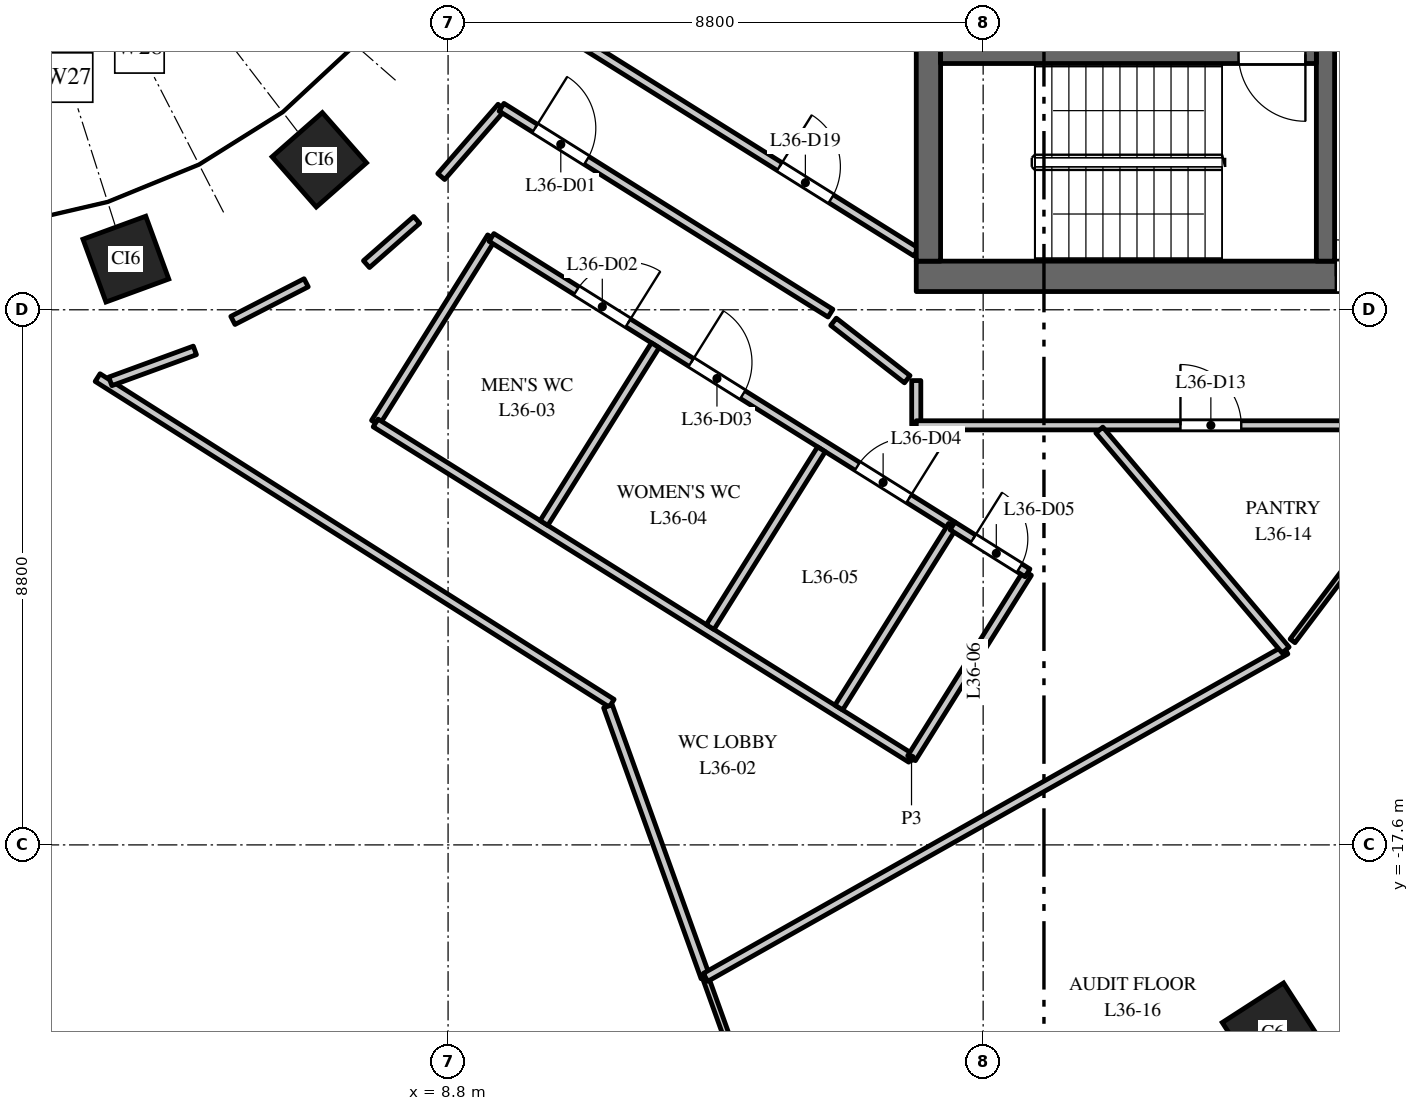
"""IFC4 building model, lengths in metres.
Left out: names, types, materials, properties, quantities, classifications, styles, units other than length and angle.
Written with IfcOpenShell. Run it as: python <this file> out.ifc"""

import sys

from ifc_helpers import new_model, si_unit, direction, frame, frame_2d, origin, origin_2d, place, context, subcontext, project, spatial, rectangle, extrude, element, fill, save


model = new_model("IFC4")
c1 = context("Model", 3, precision=1e-05, world=origin(), true_north=direction((0.0, 1.0)))
c2 = subcontext(c1, "Body", "Model", "MODEL_VIEW")
j1 = project(units=[si_unit("LENGTHUNIT", "METRE"), si_unit("PLANEANGLEUNIT", "RADIAN")], contexts=[c1])
p1 = place(None, origin())
s1 = spatial("IfcSite", under=j1, at=p1, CompositionType="ELEMENT")
p2 = place(p1, origin())
s2 = spatial("IfcBuilding", under=s1, at=p2, CompositionType="ELEMENT")
p3 = place(p2, frame((0.0, 0.0, 158.0)))
s3 = spatial("IfcBuildingStorey", under=s2, at=p3, CompositionType="ELEMENT", Elevation=158.0)
p4 = place(p3, frame((22.362, -20.7, 0.0), z_axis=(0.0, 0.0, 1.0), x_axis=(0.840247639643, 0.542202825586, 0.0)))
e1 = element("IfcColumn", 1, at=p4, inside=s3, PredefinedType="COLUMN", context=c2, shape_type="SweptSolid", body=[
    extrude(rectangle(XDim=1.2, YDim=1.2, at=origin_2d()), origin(), (0.0, 0.0, 1.0), 4.0),
])
for number, where, z_axis, x_axis in (
    (2, (3.501, -7.967, 0.0), (0.0, 0.0, 1.0), (0.939, 0.344, 0.0)),
    (3, (6.682, -6.334, 0.0), (0.0, 0.0, 1.0), (0.751, 0.66, 0.0)),
):
    element("IfcColumn", number, at=place(p3, frame(where, z_axis=z_axis, x_axis=x_axis)), inside=s3, PredefinedType="COLUMN", context=c2, shape_type="SweptSolid", body=[
        extrude(rectangle(XDim=1.1, YDim=1.1, at=origin_2d()), origin(), (0.0, 0.0, 1.0), 4.0),
    ])
p5 = place(p3, frame((16.5, -8.25, 0.0), z_axis=(0.0, 0.0, 1.0), x_axis=(1.0, 0.0, 0.0)))
e4 = element("IfcWall", 4, at=p5, inside=s3, PredefinedType="SHEAR", context=c2, shape_type="SweptSolid", body=[
    extrude(rectangle(XDim=15.0, YDim=0.5, at=frame_2d((7.5, 0.0))), origin(), (0.0, 0.0, 1.0), 3.7),
])
p6 = place(p5, frame((6.9, 0.0, 0.0)))
e5 = element("IfcOpeningElement", 5, at=p6, cuts=e4, PredefinedType="OPENING", context=c2, shape_type="SweptSolid", body=[
    extrude(rectangle(XDim=1.2, YDim=2.1, at=frame_2d((0.6, 1.05))), frame((0.0, 0.26, 0.0), z_axis=(0.0, -1.0, 0.0), x_axis=(1.0, 0.0, 0.0)), (0.0, 0.0, 1.0), 0.52),
])
p7 = place(p5, frame((12.05, 0.0, 0.0)))
e6 = element("IfcOpeningElement", 6, at=p7, cuts=e4, PredefinedType="OPENING", context=c2, shape_type="SweptSolid", body=[
    extrude(rectangle(XDim=0.9, YDim=2.1, at=frame_2d((0.45, 1.05))), frame((0.0, 0.26, 0.0), z_axis=(0.0, -1.0, 0.0), x_axis=(1.0, 0.0, 0.0)), (0.0, 0.0, 1.0), 0.52),
])
p8 = place(p3, frame((16.7, -8.0, 0.0), z_axis=(0.0, 0.0, 1.0), x_axis=(0.0, 1.0, 0.0)))
e7 = element("IfcWall", 7, at=p8, inside=s3, PredefinedType="SHEAR", context=c2, shape_type="SweptSolid", body=[
    extrude(rectangle(XDim=16.0, YDim=0.4, at=frame_2d((8.0, 0.0))), origin(), (0.0, 0.0, 1.0), 3.7),
])
p9 = place(p3, frame((23.23, -8.0, 0.0), z_axis=(0.0, 0.0, 1.0), x_axis=(0.0, 1.0, 0.0)))
e8 = element("IfcWall", 8, at=p9, inside=s3, PredefinedType="SHEAR", context=c2, shape_type="SweptSolid", body=[
    extrude(rectangle(XDim=7.875, YDim=0.3, at=frame_2d((3.938, 0.0))), origin(), (0.0, 0.0, 1.0), 3.7),
])
p10 = place(p9, frame((5.15, 0.0, 0.0)))
e9 = element("IfcOpeningElement", 9, at=p10, cuts=e8, PredefinedType="OPENING", context=c2, shape_type="SweptSolid", body=[
    extrude(rectangle(XDim=1.1, YDim=2.1, at=frame_2d((0.55, 1.05))), frame((0.0, 0.16, 0.0), z_axis=(0.0, -1.0, 0.0), x_axis=(1.0, 0.0, 0.0)), (0.0, 0.0, 1.0), 0.32),
])
p11 = place(p3, frame((16.9, -4.6, 0.0), z_axis=(0.0, 0.0, 1.0), x_axis=(1.0, 0.0, 0.0)))
e10 = element("IfcWall", 10, at=p11, inside=s3, PredefinedType="SHEAR", context=c2, shape_type="SweptSolid", body=[
    extrude(rectangle(XDim=6.18, YDim=0.3, at=frame_2d((3.09, 0.0))), origin(), (0.0, 0.0, 1.0), 3.7),
])
p12 = place(p11, frame((4.9, 0.0, 0.0)))
e11 = element("IfcOpeningElement", 11, at=p12, cuts=e10, PredefinedType="OPENING", context=c2, shape_type="SweptSolid", body=[
    extrude(rectangle(XDim=1.1, YDim=2.1, at=frame_2d((0.55, 1.05))), frame((0.0, 0.16, 0.0), z_axis=(0.0, -1.0, 0.0), x_axis=(1.0, 0.0, 0.0)), (0.0, 0.0, 1.0), 0.32),
])
p13 = place(p3, frame((3.036, -9.915, 0.0), z_axis=(0.0, 0.0, 1.0), x_axis=(0.844814664865, -0.535059045367, 0.0)))
e12 = element("IfcWall", 12, at=p13, inside=s3, PredefinedType="PARTITIONING", context=c2, shape_type="SweptSolid", body=[
    extrude(rectangle(XDim=10.008, YDim=0.15, at=frame_2d((5.004, 0.0))), origin(), (0.0, 0.0, 1.0), 2.85),
])
p14 = place(p3, frame((3.245, -9.977, 0.0), z_axis=(0.0, 0.0, 1.0), x_axis=(0.939083928338, 0.343687904263, 0.0)))
e13 = element("IfcWall", 13, at=p14, inside=s3, PredefinedType="PARTITIONING", context=c2, shape_type="SweptSolid", body=[
    extrude(rectangle(XDim=1.481, YDim=0.15, at=frame_2d((0.741, 0.0))), origin(), (0.0, 0.0, 1.0), 3.7),
])
p15 = place(p3, frame((5.261, -8.975, 0.0), z_axis=(0.0, 0.0, 1.0), x_axis=(0.889472002788, 0.456989667559, 0.0)))
e14 = element("IfcWall", 14, at=p15, inside=s3, PredefinedType="PARTITIONING", context=c2, shape_type="SweptSolid", body=[
    extrude(rectangle(XDim=1.355, YDim=0.15, at=frame_2d((0.677, 0.0))), origin(), (0.0, 0.0, 1.0), 2.85),
])
p16 = place(p3, frame((7.458, -8.049, 0.0), z_axis=(0.0, 0.0, 1.0), x_axis=(0.75060787095, 0.660747927782, 0.0)))
e15 = element("IfcWall", 15, at=p16, inside=s3, PredefinedType="PARTITIONING", context=c2, shape_type="SweptSolid", body=[
    extrude(rectangle(XDim=1.1, YDim=0.15, at=frame_2d((0.55, 0.0))), origin(), (0.0, 0.0, 1.0), 3.7),
])
p17 = place(p3, frame((7.605, -10.659, 0.0), z_axis=(0.0, 0.0, 1.0), x_axis=(0.530602380468, 0.847620855006, 0.0)))
e16 = element("IfcWall", 16, at=p17, inside=s3, PredefinedType="PARTITIONING", context=c2, shape_type="SweptSolid", body=[
    extrude(rectangle(XDim=3.6, YDim=0.15, at=frame_2d((1.8, 0.0))), origin(), (0.0, 0.0, 1.0), 3.7),
])
p18 = place(p3, frame((7.608, -10.661, 0.0), z_axis=(0.0, 0.0, 1.0), x_axis=(0.847562482532, -0.530695617284, 0.0)))
e17 = element("IfcWall", 17, at=p18, inside=s3, PredefinedType="PARTITIONING", context=c2, shape_type="SweptSolid", body=[
    extrude(rectangle(XDim=10.392, YDim=0.15, at=frame_2d((5.196, 0.0))), origin(), (0.0, 0.0, 1.0), 3.7),
])
p19 = place(p3, frame((8.687, -6.609, 0.0), z_axis=(0.0, 0.0, 1.0), x_axis=(0.656454677423, 0.75436546613, 0.0)))
e18 = element("IfcWall", 18, at=p19, inside=s3, PredefinedType="PARTITIONING", context=c2, shape_type="SweptSolid", body=[
    extrude(rectangle(XDim=1.511, YDim=0.15, at=frame_2d((0.755, 0.0))), origin(), (0.0, 0.0, 1.0), 3.7),
])
p20 = place(p3, frame((9.514, -7.61, 0.0), z_axis=(0.0, 0.0, 1.0), x_axis=(0.847740567707, -0.530411095155, 0.0)))
e19 = element("IfcWall", 19, at=p20, inside=s3, PredefinedType="PARTITIONING", context=c2, shape_type="SweptSolid", body=[
    extrude(rectangle(XDim=8.944, YDim=0.15, at=frame_2d((4.472, 0.0))), origin(), (0.0, 0.0, 1.0), 3.7),
])
p21 = place(p20, frame((1.65, 0.0, 0.0)))
e20 = element("IfcOpeningElement", 20, at=p21, cuts=e19, PredefinedType="OPENING", context=c2, shape_type="SweptSolid", body=[
    extrude(rectangle(XDim=1.0, YDim=2.1, at=frame_2d((0.5, 1.05))), frame((0.0, 0.085, 0.0), z_axis=(0.0, -1.0, 0.0), x_axis=(1.0, 0.0, 0.0)), (0.0, 0.0, 1.0), 0.17),
])
p22 = place(p20, frame((3.874, 0.0, 0.0)))
e21 = element("IfcOpeningElement", 21, at=p22, cuts=e19, PredefinedType="OPENING", context=c2, shape_type="SweptSolid", body=[
    extrude(rectangle(XDim=1.0, YDim=2.1, at=frame_2d((0.5, 1.05))), frame((0.0, 0.085, 0.0), z_axis=(0.0, -1.0, 0.0), x_axis=(1.0, 0.0, 0.0)), (0.0, 0.0, 1.0), 0.17),
])
p23 = place(p20, frame((7.098, 0.0, 0.0)))
e22 = element("IfcOpeningElement", 22, at=p23, cuts=e19, PredefinedType="OPENING", context=c2, shape_type="SweptSolid", body=[
    extrude(rectangle(XDim=1.0, YDim=2.1, at=frame_2d((0.5, 1.05))), frame((0.0, 0.085, 0.0), z_axis=(0.0, -1.0, 0.0), x_axis=(1.0, 0.0, 0.0)), (0.0, 0.0, 1.0), 0.17),
])
p24 = place(p3, frame((9.679, -5.469, 0.0), z_axis=(0.0, 0.0, 1.0), x_axis=(0.847602682855, -0.530631408811, 0.0)))
e23 = element("IfcWall", 23, at=p24, inside=s3, PredefinedType="PARTITIONING", context=c2, shape_type="SweptSolid", body=[
    extrude(rectangle(XDim=6.383, YDim=0.15, at=frame_2d((3.191, 0.0))), origin(), (0.0, 0.0, 1.0), 3.7),
])
p25 = place(p24, frame((0.65, 0.0, 0.0)))
e24 = element("IfcOpeningElement", 24, at=p25, cuts=e23, PredefinedType="OPENING", context=c2, shape_type="SweptSolid", body=[
    extrude(rectangle(XDim=1.0, YDim=2.1, at=frame_2d((0.5, 1.05))), frame((0.0, 0.085, 0.0), z_axis=(0.0, -1.0, 0.0), x_axis=(1.0, 0.0, 0.0)), (0.0, 0.0, 1.0), 0.17),
])
p26 = place(p3, frame((10.377, -12.306, 0.0), z_axis=(0.0, 0.0, 1.0), x_axis=(0.530889428354, 0.847441098167, 0.0)))
e25 = element("IfcWall", 25, at=p26, inside=s3, PredefinedType="PARTITIONING", context=c2, shape_type="SweptSolid", body=[
    extrude(rectangle(XDim=3.449, YDim=0.15, at=frame_2d((1.725, 0.0))), origin(), (0.0, 0.0, 1.0), 3.7),
])
p27 = place(p3, frame((10.752, -4.254, 0.0), z_axis=(0.0, 0.0, 1.0), x_axis=(0.847690706888, -0.530490777917, 0.0)))
e26 = element("IfcWall", 26, at=p27, inside=s3, PredefinedType="PARTITIONING", context=c2, shape_type="SweptSolid", body=[
    extrude(rectangle(XDim=6.781, YDim=0.15, at=frame_2d((3.39, 0.0))), origin(), (0.0, 0.0, 1.0), 3.7),
])
p28 = place(p27, frame((4.129, 0.0, 0.0)))
e27 = element("IfcOpeningElement", 27, at=p28, cuts=e26, PredefinedType="OPENING", context=c2, shape_type="SweptSolid", body=[
    extrude(rectangle(XDim=1.0, YDim=2.1, at=frame_2d((0.5, 1.05))), frame((0.0, 0.085, 0.0), z_axis=(0.0, -1.0, 0.0), x_axis=(1.0, 0.0, 0.0)), (0.0, 0.0, 1.0), 0.17),
])
p29 = place(p3, frame((11.429, -15.32, 0.0), z_axis=(0.0, 0.0, 1.0), x_axis=(0.338520464006, -0.940959029634, 0.0)))
e28 = element("IfcWall", 28, at=p29, inside=s3, PredefinedType="PARTITIONING", context=c2, shape_type="SweptSolid", body=[
    extrude(rectangle(XDim=4.735, YDim=0.15, at=frame_2d((2.368, 0.0))), origin(), (0.0, 0.0, 1.0), 3.7),
])
p30 = place(p3, frame((13.032, -19.776, 0.0), z_axis=(0.0, 0.0, 1.0), x_axis=(0.338352371411, -0.941019485856, 0.0)))
e29 = element("IfcWall", 29, at=p30, inside=s3, PredefinedType="PARTITIONING", context=c2, shape_type="SweptSolid", body=[
    extrude(rectangle(XDim=5.959, YDim=0.1, at=frame_2d((2.979, 0.0))), origin(), (0.0, 0.0, 1.0), 2.85),
])
p31 = place(p3, frame((13.034, -19.779, 0.0), z_axis=(0.0, 0.0, 1.0), x_axis=(0.870903388322, 0.491454258512, 0.0)))
e30 = element("IfcWall", 30, at=p31, inside=s3, PredefinedType="PARTITIONING", context=c2, shape_type="SweptSolid", body=[
    extrude(rectangle(XDim=10.955, YDim=0.15, at=frame_2d((5.478, 0.0))), origin(), (0.0, 0.0, 1.0), 3.7),
])
p32 = place(p3, frame((13.11, -14.017, 0.0), z_axis=(0.0, 0.0, 1.0), x_axis=(0.530603340991, 0.847620253727, 0.0)))
e31 = element("IfcWall", 31, at=p32, inside=s3, PredefinedType="PARTITIONING", context=c2, shape_type="SweptSolid", body=[
    extrude(rectangle(XDim=3.448, YDim=0.15, at=frame_2d((1.724, 0.0))), origin(), (0.0, 0.0, 1.0), 3.7),
])
p33 = place(p3, frame((15.226, -15.341, 0.0), z_axis=(0.0, 0.0, 1.0), x_axis=(0.530602850446, 0.847620560805, 0.0)))
e32 = element("IfcWall", 32, at=p33, inside=s3, PredefinedType="PARTITIONING", context=c2, shape_type="SweptSolid", body=[
    extrude(rectangle(XDim=3.524, YDim=0.15, at=frame_2d((1.762, 0.0))), origin(), (0.0, 0.0, 1.0), 3.7),
])
p34 = place(p3, frame((16.422, -16.175, 0.0), z_axis=(0.0, 0.0, 1.0), x_axis=(0.530578570881, 0.84763575911, 0.0)))
e33 = element("IfcWall", 33, at=p34, inside=s3, PredefinedType="PARTITIONING", context=c2, shape_type="SweptSolid", body=[
    extrude(rectangle(XDim=3.596, YDim=0.15, at=frame_2d((1.798, 0.0))), origin(), (0.0, 0.0, 1.0), 3.7),
])
p35 = place(p3, frame((16.5, -10.7, 0.0), z_axis=(0.0, 0.0, 1.0), x_axis=(0.0, 1.0, 0.0)))
e34 = element("IfcWall", 34, at=p35, inside=s3, PredefinedType="PARTITIONING", context=c2, shape_type="SweptSolid", body=[
    extrude(rectangle(XDim=0.736, YDim=0.15, at=frame_2d((0.368, 0.0))), origin(), (0.0, 0.0, 1.0), 3.7),
])
p36 = place(p3, frame((16.5, -10.7, 0.0), z_axis=(0.0, 0.0, 1.0), x_axis=(1.0, 0.0, 0.0)))
e35 = element("IfcWall", 35, at=p36, inside=s3, PredefinedType="PARTITIONING", context=c2, shape_type="SweptSolid", body=[
    extrude(rectangle(XDim=15.0, YDim=0.15, at=frame_2d((7.5, 0.0))), origin(), (0.0, 0.0, 1.0), 2.75),
])
p37 = place(p36, frame((4.345, 0.0, 0.0)))
e36 = element("IfcOpeningElement", 36, at=p37, cuts=e35, PredefinedType="OPENING", context=c2, shape_type="SweptSolid", body=[
    extrude(rectangle(XDim=1.0, YDim=2.1, at=frame_2d((0.5, 1.05))), frame((0.0, 0.085, 0.0), z_axis=(0.0, -1.0, 0.0), x_axis=(1.0, 0.0, 0.0)), (0.0, 0.0, 1.0), 0.17),
])
p38 = place(p36, frame((9.505, 0.0, 0.0)))
e37 = element("IfcOpeningElement", 37, at=p38, cuts=e35, PredefinedType="OPENING", context=c2, shape_type="SweptSolid", body=[
    extrude(rectangle(XDim=1.0, YDim=2.1, at=frame_2d((0.5, 1.05))), frame((0.0, 0.085, 0.0), z_axis=(0.0, -1.0, 0.0), x_axis=(1.0, 0.0, 0.0)), (0.0, 0.0, 1.0), 0.17),
])
p39 = place(p3, frame((17.096, -12.354, 0.0), z_axis=(0.0, 0.0, 1.0), x_axis=(0.847498728789, -0.530797423412, 0.0)))
e38 = element("IfcWall", 38, at=p39, inside=s3, PredefinedType="PARTITIONING", context=c2, shape_type="SweptSolid", body=[
    extrude(rectangle(XDim=1.456, YDim=0.15, at=frame_2d((0.728, 0.0))), origin(), (0.0, 0.0, 1.0), 3.7),
])
p40 = place(p39, frame((0.4, 0.0, 0.0)))
e39 = element("IfcOpeningElement", 39, at=p40, cuts=e38, PredefinedType="OPENING", context=c2, shape_type="SweptSolid", body=[
    extrude(rectangle(XDim=0.9, YDim=2.1, at=frame_2d((0.45, 1.05))), frame((0.0, 0.085, 0.0), z_axis=(0.0, -1.0, 0.0), x_axis=(1.0, 0.0, 0.0)), (0.0, 0.0, 1.0), 0.17),
])
p41 = place(p3, frame((19.511, -10.778, 0.0), z_axis=(0.0, 0.0, 1.0), x_axis=(0.646369264436, -0.763024753197, 0.0)))
e40 = element("IfcWall", 40, at=p41, inside=s3, PredefinedType="PARTITIONING", context=c2, shape_type="SweptSolid", body=[
    extrude(rectangle(XDim=4.74, YDim=0.15, at=frame_2d((2.37, 0.0))), origin(), (0.0, 0.0, 1.0), 3.7),
])
p42 = place(p3, frame((22.688, -14.245, 0.0), z_axis=(0.0, 0.0, 1.0), x_axis=(0.6020222506, 0.798479310804, 0.0)))
e41 = element("IfcWall", 41, at=p42, inside=s3, PredefinedType="PARTITIONING", context=c2, shape_type="SweptSolid", body=[
    extrude(rectangle(XDim=4.342, YDim=0.1, at=frame_2d((2.171, 0.0))), origin(), (0.0, 0.0, 1.0), 2.75),
])
p43 = place(p3, frame((16.352, -9.942, 0.0), z_axis=(0.0, 0.0, 1.0), x_axis=(-0.788950226826, 0.614457109643, 0.0)))
e42 = element("IfcWall", 42, at=p43, inside=s3, PredefinedType="PARTITIONING", context=c2, shape_type="SweptSolid", body=[
    extrude(rectangle(XDim=1.538, YDim=0.15, at=frame_2d((0.769, 0.0))), origin(), (0.0, 0.0, 1.0), 3.7),
])
p44 = place(p12, origin())
e43 = element("IfcDoor", 43, at=p44, inside=s3, OperationType="SINGLE_SWING_RIGHT", PredefinedType="DOOR", context=c2, shape_type="SweptSolid", body=[
    extrude(rectangle(XDim=1.1, YDim=2.1, at=frame_2d((0.55, 1.05))), frame((0.0, 0.025, 0.0), z_axis=(0.0, -1.0, 0.0), x_axis=(1.0, 0.0, 0.0)), (0.0, 0.0, 1.0), 0.05),
])
fill(e11, e43)
p45 = place(p6, origin())
e44 = element("IfcDoor", 44, at=p45, inside=s3, OperationType="DOUBLE_DOOR_DOUBLE_SWING", PredefinedType="DOOR", context=c2, shape_type="SweptSolid", body=[
    extrude(rectangle(XDim=1.2, YDim=2.1, at=frame_2d((0.6, 1.05))), frame((0.0, 0.025, 0.0), z_axis=(0.0, -1.0, 0.0), x_axis=(1.0, 0.0, 0.0)), (0.0, 0.0, 1.0), 0.05),
])
fill(e5, e44)
p46 = place(p25, origin())
e45 = element("IfcDoor", 45, at=p46, inside=s3, OperationType="SINGLE_SWING_LEFT", PredefinedType="DOOR", context=c2, shape_type="SweptSolid", body=[
    extrude(rectangle(XDim=1.0, YDim=2.1, at=frame_2d((0.5, 1.05))), frame((0.0, 0.025, 0.0), z_axis=(0.0, -1.0, 0.0), x_axis=(1.0, 0.0, 0.0)), (0.0, 0.0, 1.0), 0.05),
])
fill(e24, e45)
p47 = place(p21, origin())
e46 = element("IfcDoor", 46, at=p47, inside=s3, OperationType="SINGLE_SWING_RIGHT", PredefinedType="DOOR", context=c2, shape_type="SweptSolid", body=[
    extrude(rectangle(XDim=1.0, YDim=2.1, at=frame_2d((0.5, 1.05))), frame((0.0, 0.025, 0.0), z_axis=(0.0, -1.0, 0.0), x_axis=(1.0, 0.0, 0.0)), (0.0, 0.0, 1.0), 0.05),
])
fill(e20, e46)
p48 = place(p22, origin())
e47 = element("IfcDoor", 47, at=p48, inside=s3, OperationType="SINGLE_SWING_LEFT", PredefinedType="DOOR", context=c2, shape_type="SweptSolid", body=[
    extrude(rectangle(XDim=1.0, YDim=2.1, at=frame_2d((0.5, 1.05))), frame((0.0, 0.025, 0.0), z_axis=(0.0, -1.0, 0.0), x_axis=(1.0, 0.0, 0.0)), (0.0, 0.0, 1.0), 0.05),
])
fill(e21, e47)
p49 = place(p23, origin())
e48 = element("IfcDoor", 48, at=p49, inside=s3, OperationType="SINGLE_SWING_RIGHT", PredefinedType="DOOR", context=c2, shape_type="SweptSolid", body=[
    extrude(rectangle(XDim=1.0, YDim=2.1, at=frame_2d((0.5, 1.05))), frame((0.0, 0.025, 0.0), z_axis=(0.0, -1.0, 0.0), x_axis=(1.0, 0.0, 0.0)), (0.0, 0.0, 1.0), 0.05),
])
fill(e22, e48)
p50 = place(p40, origin())
e49 = element("IfcDoor", 49, at=p50, inside=s3, OperationType="SINGLE_SWING_LEFT", PredefinedType="DOOR", context=c2, shape_type="SweptSolid", body=[
    extrude(rectangle(XDim=0.9, YDim=2.1, at=frame_2d((0.45, 1.05))), frame((0.0, 0.025, 0.0), z_axis=(0.0, -1.0, 0.0), x_axis=(1.0, 0.0, 0.0)), (0.0, 0.0, 1.0), 0.05),
])
fill(e39, e49)
p51 = place(p37, origin())
e50 = element("IfcDoor", 50, at=p51, inside=s3, OperationType="SINGLE_SWING_LEFT", PredefinedType="DOOR", context=c2, shape_type="SweptSolid", body=[
    extrude(rectangle(XDim=1.0, YDim=2.1, at=frame_2d((0.5, 1.05))), frame((0.0, 0.025, 0.0), z_axis=(0.0, -1.0, 0.0), x_axis=(1.0, 0.0, 0.0)), (0.0, 0.0, 1.0), 0.05),
])
fill(e36, e50)
p52 = place(p28, origin())
e51 = element("IfcDoor", 51, at=p52, inside=s3, OperationType="SINGLE_SWING_LEFT", PredefinedType="DOOR", context=c2, shape_type="SweptSolid", body=[
    extrude(rectangle(XDim=1.0, YDim=2.1, at=frame_2d((0.5, 1.05))), frame((0.0, 0.025, 0.0), z_axis=(0.0, -1.0, 0.0), x_axis=(1.0, 0.0, 0.0)), (0.0, 0.0, 1.0), 0.05),
])
fill(e27, e51)
save(model, sys.argv[1])
